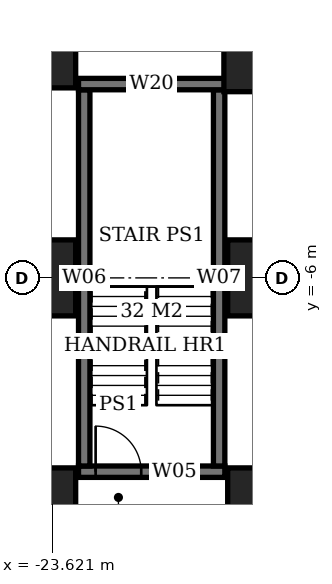
"""IFC4 building model, lengths in metres.
Left out: names, types, materials, properties, quantities, classifications, styles, units other than length and angle.
Written with IfcOpenShell. Run it as: python <this file> out.ifc"""

import sys

from ifc_helpers import new_model, si_unit, direction, frame, frame_2d, origin, origin_2d, place, context, subcontext, project, spatial, rectangle, extrude, element, fill, save


model = new_model("IFC4")
c1 = context("Model", 3, precision=1e-05, world=origin(), true_north=direction((0.0, 1.0)))
c2 = subcontext(c1, "Body", "Model", "MODEL_VIEW")
j1 = project(units=[si_unit("LENGTHUNIT", "METRE"), si_unit("PLANEANGLEUNIT", "RADIAN")], contexts=[c1])
p1 = place(None, origin())
s1 = spatial("IfcSite", under=j1, at=p1, CompositionType="ELEMENT")
p2 = place(p1, origin())
s2 = spatial("IfcBuilding", under=s1, at=p2, CompositionType="ELEMENT")
p3 = place(p2, frame((0.0, 0.0, -9.0)))
s3 = spatial("IfcBuildingStorey", under=s2, at=p3, CompositionType="ELEMENT", Elevation=-9.0)
for number, where, z_axis, x_axis in (
    (1, (-24.0, -12.0, 0.0), (0.0, 0.0, 1.0), (1.0, 0.0, 0.0)),
    (2, (-24.0, -6.0, 0.0), (0.0, 0.0, 1.0), (1.0, 0.0, 0.0)),
    (3, (-24.0, 0.0, 0.0), (0.0, 0.0, 1.0), (1.0, 0.0, 0.0)),
    (4, (-18.0, -12.0, 0.0), (0.0, 0.0, 1.0), (1.0, 0.0, 0.0)),
    (5, (-18.0, -6.0, 0.0), (0.0, 0.0, 1.0), (1.0, 0.0, 0.0)),
):
    element("IfcColumn", number, at=place(p3, frame(where, z_axis=z_axis, x_axis=x_axis)), inside=s3, PredefinedType="COLUMN", context=c2, shape_type="SweptSolid", body=[
        extrude(rectangle(XDim=2.0, YDim=2.0, at=origin_2d()), origin(), (0.0, 0.0, 1.0), 4.5),
    ])
p4 = place(p3, frame((-18.0, 0.0, 0.0), z_axis=(0.0, 0.0, 1.0), x_axis=(1.0, 0.0, 0.0)))
e6 = element("IfcColumn", 6, at=p4, inside=s3, PredefinedType="COLUMN", context=c2, shape_type="SweptSolid", body=[
    extrude(rectangle(XDim=2.2, YDim=2.2, at=origin_2d()), origin(), (0.0, 0.0, 1.0), 4.5),
])
p5 = place(p3, frame((-22.925, -11.1, 0.0), z_axis=(0.0, 0.0, 1.0), x_axis=(1.0, 0.0, 0.0)))
e7 = element("IfcWall", 7, at=p5, inside=s3, PredefinedType="SOLIDWALL", context=c2, shape_type="SweptSolid", body=[
    extrude(rectangle(XDim=3.85, YDim=0.3, at=frame_2d((1.925, 0.0))), origin(), (0.0, 0.0, 1.0), 4.25),
])
p6 = place(p5, frame((0.45, 0.0, 0.0)))
e8 = element("IfcOpeningElement", 8, at=p6, cuts=e7, PredefinedType="OPENING", context=c2, shape_type="SweptSolid", body=[
    extrude(rectangle(XDim=1.2, YDim=2.1, at=frame_2d((0.6, 1.05))), frame((0.0, 0.16, 0.0), z_axis=(0.0, -1.0, 0.0), x_axis=(1.0, 0.0, 0.0)), (0.0, 0.0, 1.0), 0.32),
])
p7 = place(p3, frame((-22.925, -0.9, 0.0), z_axis=(0.0, 0.0, 1.0), x_axis=(1.0, 0.0, 0.0)))
e9 = element("IfcWall", 9, at=p7, inside=s3, PredefinedType="SOLIDWALL", context=c2, shape_type="SweptSolid", body=[
    extrude(rectangle(XDim=3.85, YDim=0.3, at=frame_2d((1.925, 0.0))), origin(), (0.0, 0.0, 1.0), 4.25),
])
for number, where, z_axis, x_axis in (
    (10, (-22.775, -10.95, 0.0), (0.0, 0.0, 1.0), (0.0, 1.0, 0.0)),
    (11, (-19.225, -10.95, 0.0), (0.0, 0.0, 1.0), (0.0, 1.0, 0.0)),
):
    element("IfcWall", number, at=place(p3, frame(where, z_axis=z_axis, x_axis=x_axis)), inside=s3, PredefinedType="SOLIDWALL", context=c2, shape_type="SweptSolid", body=[
        extrude(rectangle(XDim=9.9, YDim=0.3, at=frame_2d((4.95, 0.0))), origin(), (0.0, 0.0, 1.0), 4.25),
    ])
p8 = place(p6, origin())
e12 = element("IfcDoor", 12, at=p8, inside=s3, OperationType="SINGLE_SWING_LEFT", PredefinedType="DOOR", context=c2, shape_type="SweptSolid", body=[
    extrude(rectangle(XDim=1.2, YDim=2.1, at=frame_2d((0.6, 1.05))), frame((0.0, 0.025, 0.0), z_axis=(0.0, -1.0, 0.0), x_axis=(1.0, 0.0, 0.0)), (0.0, 0.0, 1.0), 0.05),
])
fill(e8, e12)
save(model, sys.argv[1])
